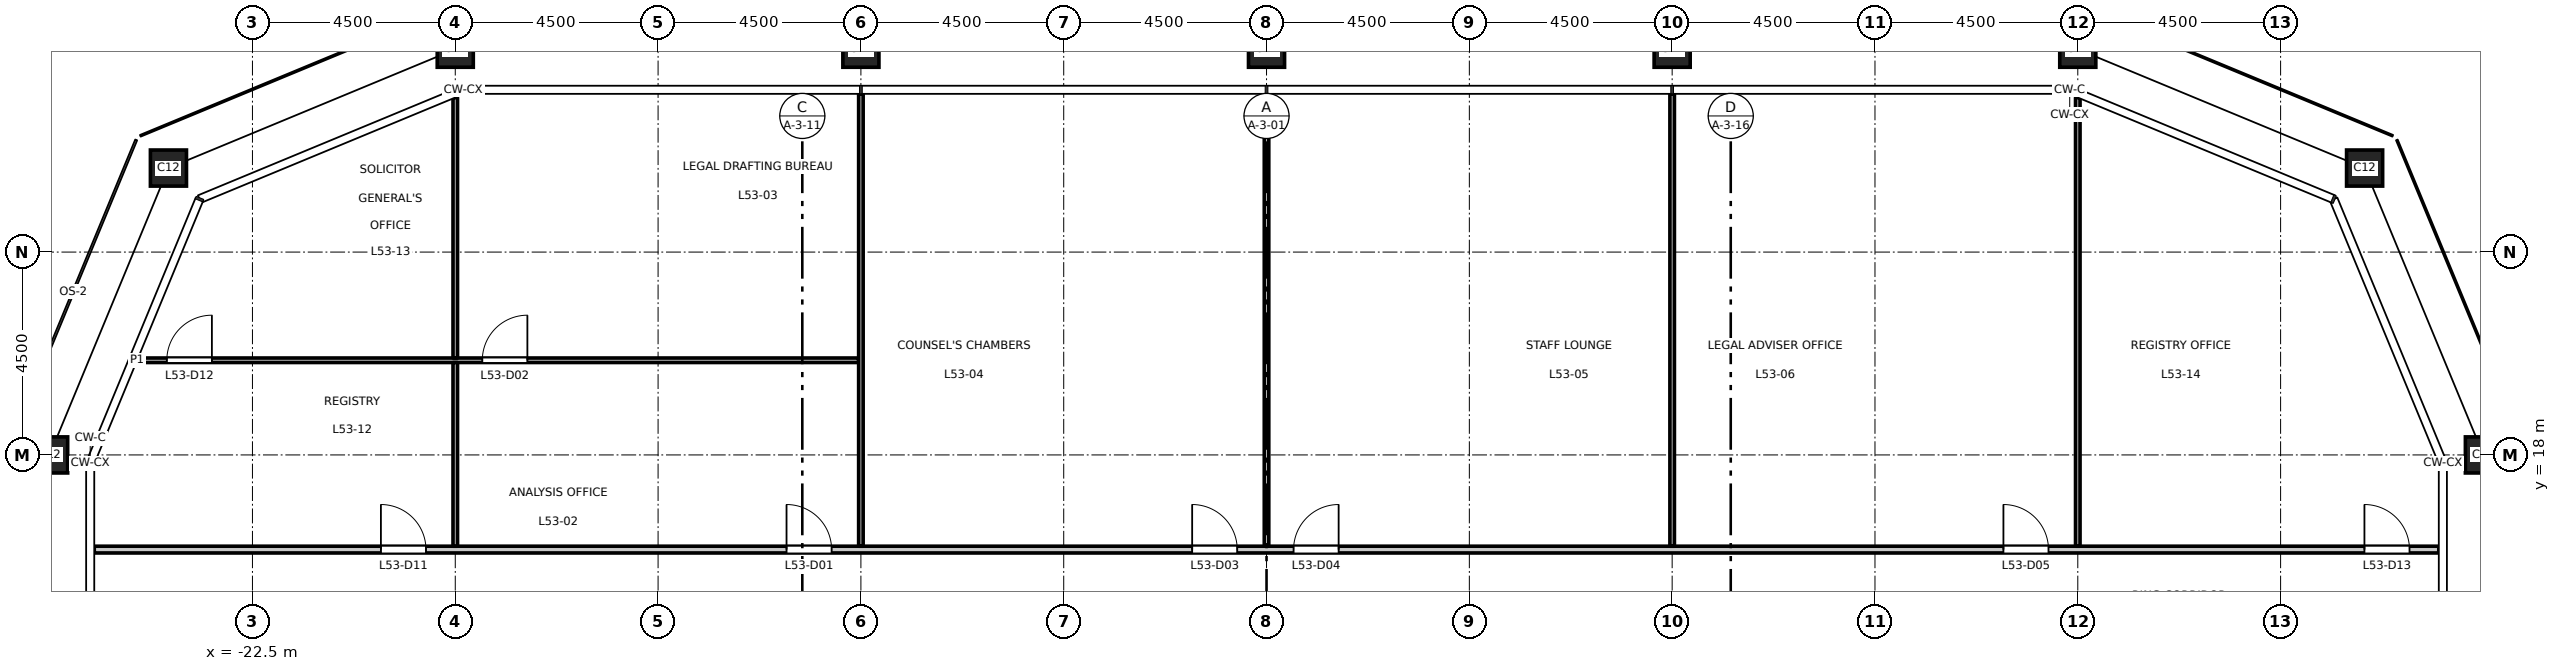
"""IFC4 building model, lengths in metres.
Left out: names, types, materials, properties, quantities, classifications, styles, units other than length and angle.
Written with IfcOpenShell. Run it as: python <this file> out.ifc"""

import sys

from ifc_helpers import new_model, si_unit, direction, frame, frame_2d, origin, origin_2d, place, context, subcontext, project, spatial, rectangle, hollow_rectangle, extrude, element, fill, save


model = new_model("IFC4")
c1 = context("Model", 3, precision=1e-05, world=origin(), true_north=direction((0.0, 1.0)))
c2 = subcontext(c1, "Body", "Model", "MODEL_VIEW")
j1 = project(units=[si_unit("LENGTHUNIT", "METRE"), si_unit("PLANEANGLEUNIT", "RADIAN")], contexts=[c1])
p1 = place(None, origin())
s1 = spatial("IfcSite", under=j1, at=p1, CompositionType="ELEMENT")
p2 = place(p1, origin())
s2 = spatial("IfcBuilding", under=s1, at=p2, CompositionType="ELEMENT")
p3 = place(p2, frame((0.0, 0.0, 246.7)))
s3 = spatial("IfcBuildingStorey", under=s2, at=p3, CompositionType="ELEMENT", Elevation=246.7)
for number, where, z_axis, x_axis in (
    (1, (27.0, 18.0, 0.0), (0.0, 0.0, 1.0), (1.0, 0.0, 0.0)),
    (2, (24.364, 24.364, 0.0), (0.0, 0.0, 1.0), (1.0, 0.0, 0.0)),
    (3, (18.0, 27.0, 0.0), (0.0, 0.0, 1.0), (1.0, 0.0, 0.0)),
    (4, (9.0, 27.0, 0.0), (0.0, 0.0, 1.0), (1.0, 0.0, 0.0)),
    (5, (0.0, 27.0, 0.0), (0.0, 0.0, 1.0), (1.0, 0.0, 0.0)),
    (6, (-9.0, 27.0, 0.0), (0.0, 0.0, 1.0), (1.0, 0.0, 0.0)),
    (7, (-18.0, 27.0, 0.0), (0.0, 0.0, 1.0), (1.0, 0.0, 0.0)),
    (8, (-24.364, 24.364, 0.0), (0.0, 0.0, 1.0), (1.0, 0.0, 0.0)),
    (9, (-27.0, 18.0, 0.0), (0.0, 0.0, 1.0), (1.0, 0.0, 0.0)),
):
    element("IfcColumn", number, at=place(p3, frame(where, z_axis=z_axis, x_axis=x_axis)), inside=s3, PredefinedType="COLUMN", context=c2, shape_type="SweptSolid", body=[
        extrude(hollow_rectangle(XDim=0.8, YDim=0.8, WallThickness=0.045, at=origin_2d()), origin(), (0.0, 0.0, 1.0), 4.5),
    ])
p4 = place(p3, frame((-26.01, 15.9, 0.0), z_axis=(0.0, 0.0, 1.0), x_axis=(1.0, 0.0, 0.0)))
e10 = element("IfcWall", 10, at=p4, inside=s3, PredefinedType="PARTITIONING", context=c2, shape_type="SweptSolid", body=[
    extrude(rectangle(XDim=52.02, YDim=0.15, at=frame_2d((26.01, 0.0))), origin(), (0.0, 0.0, 1.0), 4.35),
])
p5 = place(p4, frame((15.36, 0.0, 0.0)))
e11 = element("IfcOpeningElement", 11, at=p5, cuts=e10, PredefinedType="OPENING", context=c2, shape_type="SweptSolid", body=[
    extrude(rectangle(XDim=1.0, YDim=2.1, at=frame_2d((0.5, 1.05))), frame((0.0, 0.085, 0.0), z_axis=(0.0, -1.0, 0.0), x_axis=(1.0, 0.0, 0.0)), (0.0, 0.0, 1.0), 0.17),
])
p6 = place(p4, frame((24.36, 0.0, 0.0)))
e12 = element("IfcOpeningElement", 12, at=p6, cuts=e10, PredefinedType="OPENING", context=c2, shape_type="SweptSolid", body=[
    extrude(rectangle(XDim=1.0, YDim=2.1, at=frame_2d((0.5, 1.05))), frame((0.0, 0.085, 0.0), z_axis=(0.0, -1.0, 0.0), x_axis=(1.0, 0.0, 0.0)), (0.0, 0.0, 1.0), 0.17),
])
p7 = place(p4, frame((26.61, 0.0, 0.0)))
e13 = element("IfcOpeningElement", 13, at=p7, cuts=e10, PredefinedType="OPENING", context=c2, shape_type="SweptSolid", body=[
    extrude(rectangle(XDim=1.0, YDim=2.1, at=frame_2d((0.5, 1.05))), frame((0.0, 0.085, 0.0), z_axis=(0.0, -1.0, 0.0), x_axis=(1.0, 0.0, 0.0)), (0.0, 0.0, 1.0), 0.17),
])
p8 = place(p4, frame((42.36, 0.0, 0.0)))
e14 = element("IfcOpeningElement", 14, at=p8, cuts=e10, PredefinedType="OPENING", context=c2, shape_type="SweptSolid", body=[
    extrude(rectangle(XDim=1.0, YDim=2.1, at=frame_2d((0.5, 1.05))), frame((0.0, 0.085, 0.0), z_axis=(0.0, -1.0, 0.0), x_axis=(1.0, 0.0, 0.0)), (0.0, 0.0, 1.0), 0.17),
])
p9 = place(p4, frame((6.36, 0.0, 0.0)))
e15 = element("IfcOpeningElement", 15, at=p9, cuts=e10, PredefinedType="OPENING", context=c2, shape_type="SweptSolid", body=[
    extrude(rectangle(XDim=1.0, YDim=2.1, at=frame_2d((0.5, 1.05))), frame((0.0, 0.085, 0.0), z_axis=(0.0, -1.0, 0.0), x_axis=(1.0, 0.0, 0.0)), (0.0, 0.0, 1.0), 0.17),
])
p10 = place(p4, frame((50.37, 0.0, 0.0)))
e16 = element("IfcOpeningElement", 16, at=p10, cuts=e10, PredefinedType="OPENING", context=c2, shape_type="SweptSolid", body=[
    extrude(rectangle(XDim=1.0, YDim=2.1, at=frame_2d((0.5, 1.05))), frame((0.0, 0.085, 0.0), z_axis=(0.0, -1.0, 0.0), x_axis=(1.0, 0.0, 0.0)), (0.0, 0.0, 1.0), 0.17),
])
p11 = place(p3, frame((-25.058, 20.1, 0.0), z_axis=(0.0, 0.0, 1.0), x_axis=(1.0, 0.0, 0.0)))
e17 = element("IfcWall", 17, at=p11, inside=s3, PredefinedType="PARTITIONING", context=c2, shape_type="SweptSolid", body=[
    extrude(rectangle(XDim=16.008, YDim=0.1, at=frame_2d((8.004, 0.0))), origin(), (0.0, 0.0, 1.0), 4.35),
])
p12 = place(p11, frame((7.658, 0.0, 0.0)))
e18 = element("IfcOpeningElement", 18, at=p12, cuts=e17, PredefinedType="OPENING", context=c2, shape_type="SweptSolid", body=[
    extrude(rectangle(XDim=1.0, YDim=2.1, at=frame_2d((0.5, 1.05))), frame((0.0, 0.06, 0.0), z_axis=(0.0, -1.0, 0.0), x_axis=(1.0, 0.0, 0.0)), (0.0, 0.0, 1.0), 0.12),
])
p13 = place(p11, frame((0.658, 0.0, 0.0)))
e19 = element("IfcOpeningElement", 19, at=p13, cuts=e17, PredefinedType="OPENING", context=c2, shape_type="SweptSolid", body=[
    extrude(rectangle(XDim=1.0, YDim=2.1, at=frame_2d((0.5, 1.05))), frame((0.0, 0.06, 0.0), z_axis=(0.0, -1.0, 0.0), x_axis=(1.0, 0.0, 0.0)), (0.0, 0.0, 1.0), 0.12),
])
p14 = place(p3, frame((-18.0, 15.975, 0.0), z_axis=(0.0, 0.0, 1.0), x_axis=(0.0, 1.0, 0.0)))
e20 = element("IfcWall", 20, at=p14, inside=s3, PredefinedType="PARTITIONING", context=c2, shape_type="SweptSolid", body=[
    extrude(rectangle(XDim=4.075, YDim=0.1, at=frame_2d((2.038, 0.0))), origin(), (0.0, 0.0, 1.0), 3.65),
])
p15 = place(p3, frame((-18.0, 20.15, 0.0), z_axis=(0.0, 0.0, 1.0), x_axis=(0.0, 1.0, 0.0)))
e21 = element("IfcWall", 21, at=p15, inside=s3, PredefinedType="PARTITIONING", context=c2, shape_type="SweptSolid", body=[
    extrude(rectangle(XDim=5.778, YDim=0.1, at=frame_2d((2.889, 0.0))), origin(), (0.0, 0.0, 1.0), 3.65),
])
p16 = place(p3, frame((-9.0, 15.975, 0.0), z_axis=(0.0, 0.0, 1.0), x_axis=(0.0, 1.0, 0.0)))
e22 = element("IfcWall", 22, at=p16, inside=s3, PredefinedType="PARTITIONING", context=c2, shape_type="SweptSolid", body=[
    extrude(rectangle(XDim=10.035, YDim=0.1, at=frame_2d((5.018, 0.0))), origin(), (0.0, 0.0, 1.0), 3.65),
])
p17 = place(p3, frame((0.0, 15.975, 0.0), z_axis=(0.0, 0.0, 1.0), x_axis=(0.0, 1.0, 0.0)))
e23 = element("IfcWall", 23, at=p17, inside=s3, PredefinedType="PARTITIONING", context=c2, shape_type="SweptSolid", body=[
    extrude(rectangle(XDim=10.035, YDim=0.1, at=frame_2d((5.018, 0.0))), origin(), (0.0, 0.0, 1.0), 3.55),
])
p18 = place(p3, frame((9.0, 15.975, 0.0), z_axis=(0.0, 0.0, 1.0), x_axis=(0.0, 1.0, 0.0)))
e24 = element("IfcWall", 24, at=p18, inside=s3, PredefinedType="PARTITIONING", context=c2, shape_type="SweptSolid", body=[
    extrude(rectangle(XDim=10.035, YDim=0.1, at=frame_2d((5.018, 0.0))), origin(), (0.0, 0.0, 1.0), 3.65),
])
p19 = place(p3, frame((18.0, 15.975, 0.0), z_axis=(0.0, 0.0, 1.0), x_axis=(0.0, 1.0, 0.0)))
e25 = element("IfcWall", 25, at=p19, inside=s3, PredefinedType="PARTITIONING", context=c2, shape_type="SweptSolid", body=[
    extrude(rectangle(XDim=9.953, YDim=0.1, at=frame_2d((4.977, 0.0))), origin(), (0.0, 0.0, 1.0), 3.65),
])
p20 = place(p5, origin())
e26 = element("IfcDoor", 26, at=p20, inside=s3, OperationType="SINGLE_SWING_LEFT", PredefinedType="DOOR", context=c2, shape_type="SweptSolid", body=[
    extrude(rectangle(XDim=1.0, YDim=2.1, at=frame_2d((0.5, 1.05))), frame((0.0, 0.025, 0.0), z_axis=(0.0, -1.0, 0.0), x_axis=(1.0, 0.0, 0.0)), (0.0, 0.0, 1.0), 0.05),
])
fill(e11, e26)
p21 = place(p12, origin())
e27 = element("IfcDoor", 27, at=p21, inside=s3, OperationType="SINGLE_SWING_RIGHT", PredefinedType="DOOR", context=c2, shape_type="SweptSolid", body=[
    extrude(rectangle(XDim=1.0, YDim=2.1, at=frame_2d((0.5, 1.05))), frame((0.0, 0.025, 0.0), z_axis=(0.0, -1.0, 0.0), x_axis=(1.0, 0.0, 0.0)), (0.0, 0.0, 1.0), 0.05),
])
fill(e18, e27)
p22 = place(p6, origin())
e28 = element("IfcDoor", 28, at=p22, inside=s3, OperationType="SINGLE_SWING_LEFT", PredefinedType="DOOR", context=c2, shape_type="SweptSolid", body=[
    extrude(rectangle(XDim=1.0, YDim=2.1, at=frame_2d((0.5, 1.05))), frame((0.0, 0.025, 0.0), z_axis=(0.0, -1.0, 0.0), x_axis=(1.0, 0.0, 0.0)), (0.0, 0.0, 1.0), 0.05),
])
fill(e12, e28)
p23 = place(p7, origin())
e29 = element("IfcDoor", 29, at=p23, inside=s3, OperationType="SINGLE_SWING_RIGHT", PredefinedType="DOOR", context=c2, shape_type="SweptSolid", body=[
    extrude(rectangle(XDim=1.0, YDim=2.1, at=frame_2d((0.5, 1.05))), frame((0.0, 0.025, 0.0), z_axis=(0.0, -1.0, 0.0), x_axis=(1.0, 0.0, 0.0)), (0.0, 0.0, 1.0), 0.05),
])
fill(e13, e29)
p24 = place(p8, origin())
e30 = element("IfcDoor", 30, at=p24, inside=s3, OperationType="SINGLE_SWING_LEFT", PredefinedType="DOOR", context=c2, shape_type="SweptSolid", body=[
    extrude(rectangle(XDim=1.0, YDim=2.1, at=frame_2d((0.5, 1.05))), frame((0.0, 0.025, 0.0), z_axis=(0.0, -1.0, 0.0), x_axis=(1.0, 0.0, 0.0)), (0.0, 0.0, 1.0), 0.05),
])
fill(e14, e30)
p25 = place(p9, origin())
e31 = element("IfcDoor", 31, at=p25, inside=s3, OperationType="SINGLE_SWING_LEFT", PredefinedType="DOOR", context=c2, shape_type="SweptSolid", body=[
    extrude(rectangle(XDim=1.0, YDim=2.1, at=frame_2d((0.5, 1.05))), frame((0.0, 0.025, 0.0), z_axis=(0.0, -1.0, 0.0), x_axis=(1.0, 0.0, 0.0)), (0.0, 0.0, 1.0), 0.05),
])
fill(e15, e31)
p26 = place(p13, origin())
e32 = element("IfcDoor", 32, at=p26, inside=s3, OperationType="SINGLE_SWING_RIGHT", PredefinedType="DOOR", context=c2, shape_type="SweptSolid", body=[
    extrude(rectangle(XDim=1.0, YDim=2.1, at=frame_2d((0.5, 1.05))), frame((0.0, 0.025, 0.0), z_axis=(0.0, -1.0, 0.0), x_axis=(1.0, 0.0, 0.0)), (0.0, 0.0, 1.0), 0.05),
])
fill(e19, e32)
p27 = place(p10, origin())
e33 = element("IfcDoor", 33, at=p27, inside=s3, OperationType="SINGLE_SWING_LEFT", PredefinedType="DOOR", context=c2, shape_type="SweptSolid", body=[
    extrude(rectangle(XDim=1.0, YDim=2.1, at=frame_2d((0.5, 1.05))), frame((0.0, 0.025, 0.0), z_axis=(0.0, -1.0, 0.0), x_axis=(1.0, 0.0, 0.0)), (0.0, 0.0, 1.0), 0.05),
])
fill(e16, e33)
save(model, sys.argv[1])
